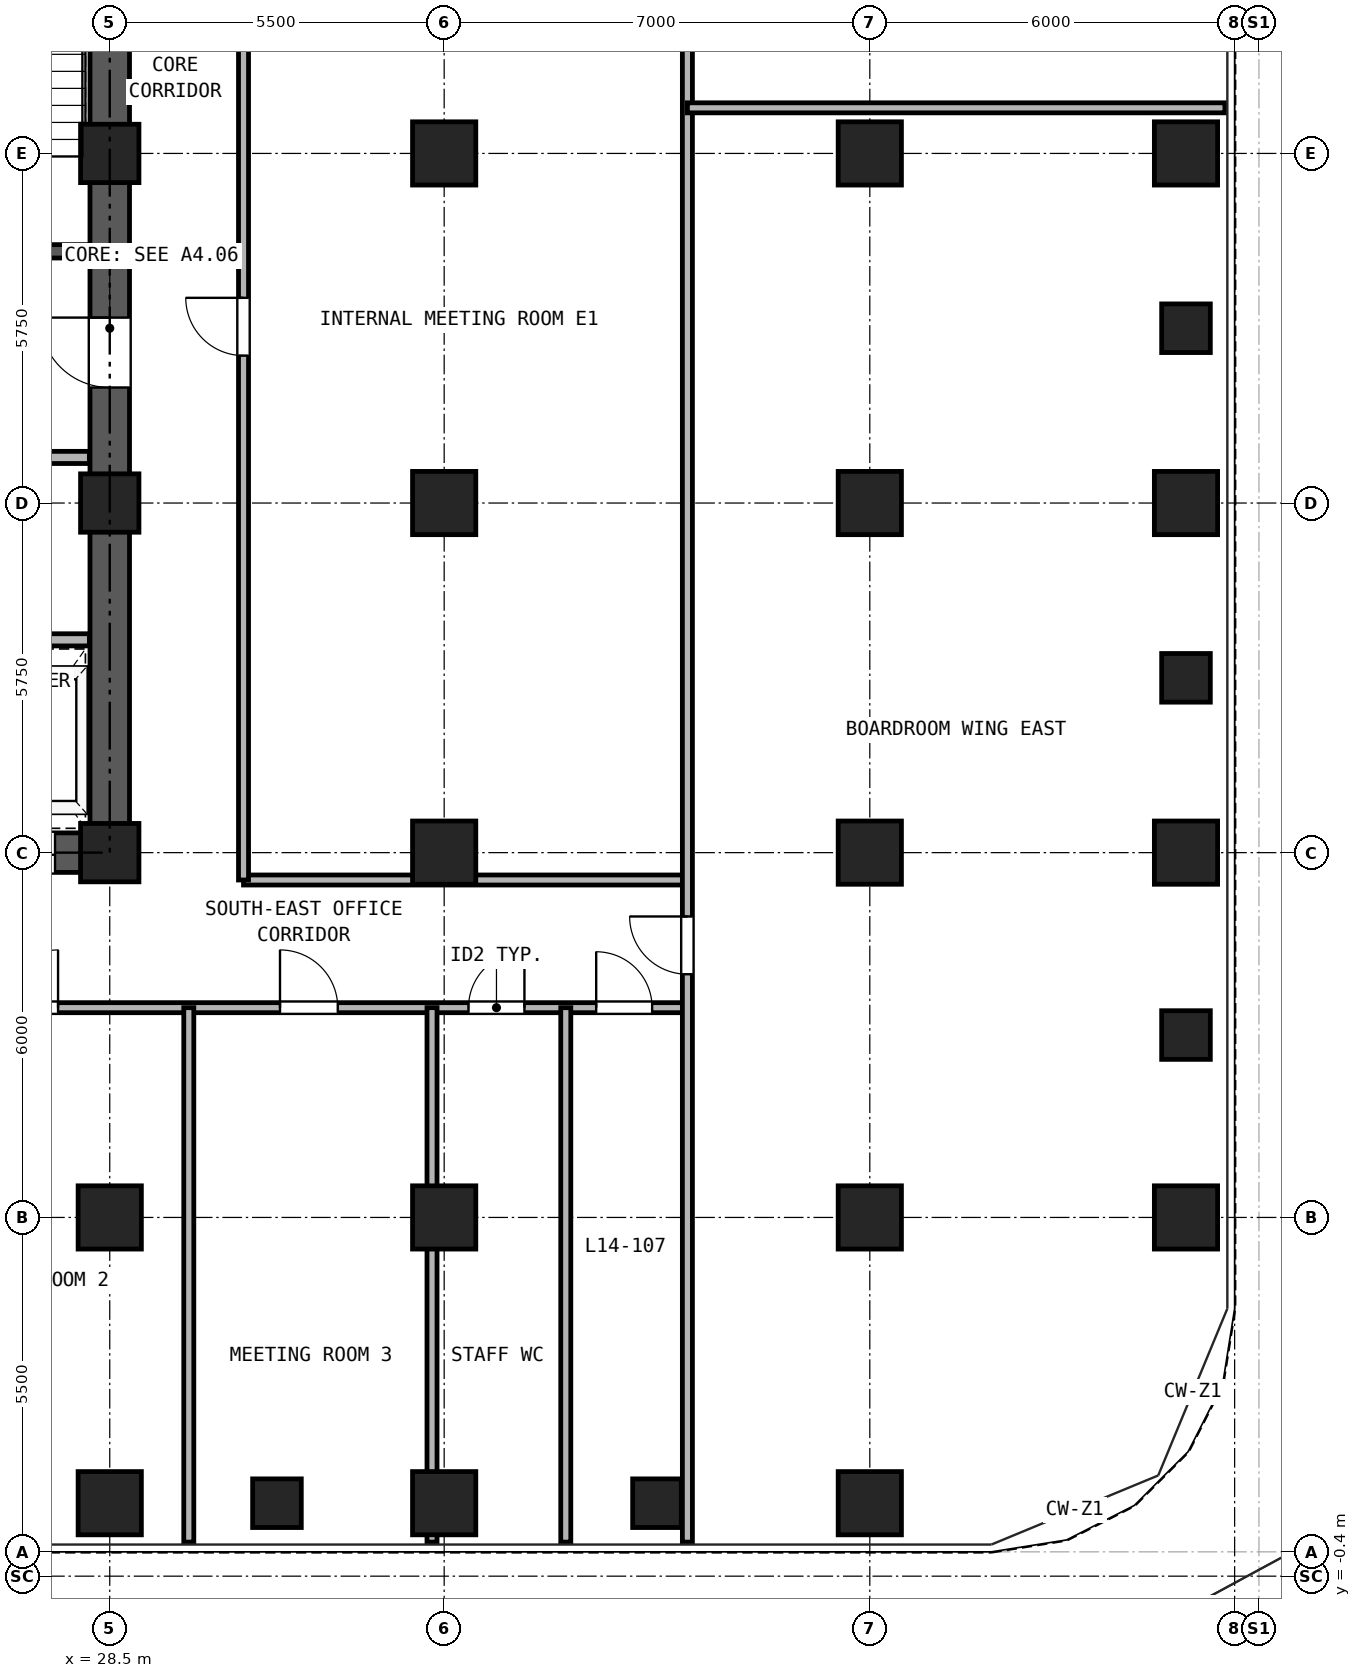
"""IFC4 building model, lengths in metres.
Left out: names, types, materials, properties, quantities, classifications, styles, units other than length and angle.
Written with IfcOpenShell. Run it as: python <this file> out.ifc"""

import sys

from ifc_helpers import new_model, si_unit, direction, frame, frame_2d, origin, origin_2d, place, context, subcontext, project, spatial, rectangle, hollow_rectangle, extrude, source, transform, mapped, element, fill, save


model = new_model("IFC4")
c1 = context("Model", 3, precision=1e-05, world=origin(), true_north=direction((0.0, 1.0)))
c2 = subcontext(c1, "Body", "Model", "MODEL_VIEW")
j1 = project(units=[si_unit("LENGTHUNIT", "METRE"), si_unit("PLANEANGLEUNIT", "RADIAN")], contexts=[c1])
p1 = place(None, origin())
s1 = spatial("IfcSite", under=j1, at=p1, CompositionType="ELEMENT")
p2 = place(p1, origin())
s2 = spatial("IfcBuilding", under=s1, at=p2, CompositionType="ELEMENT")
p3 = place(p2, frame((0.0, 0.0, 54.9)))
s3 = spatial("IfcBuildingStorey", under=s2, at=p3, CompositionType="ELEMENT", Elevation=54.9)
m1 = source(origin(), c2, "Body", "SweptSolid", [
    extrude(hollow_rectangle(XDim=1.04, YDim=1.04, WallThickness=0.065, at=origin_2d()), origin(), (0.0, 0.0, 1.0), 3.32),
])
for number, where, z_axis, x_axis in (
    (1, (28.5, 0.8, 0.0), (0.0, 0.0, 1.0), (1.0, 0.0, 0.0)),
    (2, (34.0, 0.8, 0.0), (0.0, 0.0, 1.0), (1.0, 0.0, 0.0)),
    (3, (41.0, 0.8, 0.0), (0.0, 0.0, 1.0), (1.0, 0.0, 0.0)),
    (4, (46.2, 5.5, 0.0), (0.0, 0.0, 1.0), (1.0, 0.0, 0.0)),
    (5, (46.2, 11.5, 0.0), (0.0, 0.0, 1.0), (1.0, 0.0, 0.0)),
    (6, (46.2, 17.25, 0.0), (0.0, 0.0, 1.0), (1.0, 0.0, 0.0)),
    (7, (46.2, 23.0, 0.0), (0.0, 0.0, 1.0), (1.0, 0.0, 0.0)),
    (8, (28.5, 5.5, 0.0), (0.0, 0.0, 1.0), (1.0, 0.0, 0.0)),
):
    element("IfcColumn", number, at=place(p3, frame(where, z_axis=z_axis, x_axis=x_axis)), inside=s3, PredefinedType="COLUMN", context=c2, shape_type="MappedRepresentation", body=[
        mapped(m1, transform((0.0, 0.0, 0.0), x_axis=(1.0, 0.0, 0.0), y_axis=(0.0, 1.0, 0.0), z_axis=(0.0, 0.0, 1.0), scale=1.0)),
    ])
m2 = source(origin(), c2, "Body", "SweptSolid", [
    extrude(hollow_rectangle(XDim=0.96, YDim=0.96, WallThickness=0.06, at=origin_2d()), origin(), (0.0, 0.0, 1.0), 3.32),
])
for number, where, z_axis, x_axis in (
    (9, (28.5, 11.5, 0.0), (0.0, 0.0, 1.0), (1.0, 0.0, 0.0)),
    (10, (28.5, 17.25, 0.0), (0.0, 0.0, 1.0), (1.0, 0.0, 0.0)),
    (11, (28.5, 23.0, 0.0), (0.0, 0.0, 1.0), (1.0, 0.0, 0.0)),
):
    element("IfcColumn", number, at=place(p3, frame(where, z_axis=z_axis, x_axis=x_axis)), inside=s3, PredefinedType="COLUMN", context=c2, shape_type="MappedRepresentation", body=[
        mapped(m2, transform((0.0, 0.0, 0.0), x_axis=(1.0, 0.0, 0.0), y_axis=(0.0, 1.0, 0.0), z_axis=(0.0, 0.0, 1.0), scale=1.0)),
    ])
for number, where, z_axis, x_axis in (
    (12, (34.0, 5.5, 0.0), (0.0, 0.0, 1.0), (1.0, 0.0, 0.0)),
    (13, (34.0, 11.5, 0.0), (0.0, 0.0, 1.0), (1.0, 0.0, 0.0)),
    (14, (34.0, 17.25, 0.0), (0.0, 0.0, 1.0), (1.0, 0.0, 0.0)),
    (15, (34.0, 23.0, 0.0), (0.0, 0.0, 1.0), (1.0, 0.0, 0.0)),
    (16, (41.0, 5.5, 0.0), (0.0, 0.0, 1.0), (1.0, 0.0, 0.0)),
    (17, (41.0, 11.5, 0.0), (0.0, 0.0, 1.0), (1.0, 0.0, 0.0)),
    (18, (41.0, 17.25, 0.0), (0.0, 0.0, 1.0), (1.0, 0.0, 0.0)),
    (19, (41.0, 23.0, 0.0), (0.0, 0.0, 1.0), (1.0, 0.0, 0.0)),
):
    element("IfcColumn", number, at=place(p3, frame(where, z_axis=z_axis, x_axis=x_axis)), inside=s3, PredefinedType="COLUMN", context=c2, shape_type="MappedRepresentation", body=[
        mapped(m1, transform((0.0, 0.0, 0.0), x_axis=(1.0, 0.0, 0.0), y_axis=(0.0, 1.0, 0.0), z_axis=(0.0, 0.0, 1.0), scale=1.0)),
    ])
m3 = source(origin(), c2, "Body", "SweptSolid", [
    extrude(hollow_rectangle(XDim=0.8, YDim=0.8, WallThickness=0.045, at=origin_2d()), origin(), (0.0, 0.0, 1.0), 3.32),
])
for number, where, z_axis, x_axis in (
    (20, (31.25, 0.8, 0.0), (0.0, 0.0, 1.0), (1.0, 0.0, 0.0)),
    (21, (37.5, 0.8, 0.0), (0.0, 0.0, 1.0), (1.0, 0.0, 0.0)),
    (22, (46.2, 8.5, 0.0), (0.0, 0.0, 1.0), (1.0, 0.0, 0.0)),
    (23, (46.2, 14.375, 0.0), (0.0, 0.0, 1.0), (1.0, 0.0, 0.0)),
    (24, (46.2, 20.125, 0.0), (0.0, 0.0, 1.0), (1.0, 0.0, 0.0)),
):
    element("IfcColumn", number, at=place(p3, frame(where, z_axis=z_axis, x_axis=x_axis)), inside=s3, PredefinedType="COLUMN", context=c2, shape_type="MappedRepresentation", body=[
        mapped(m3, transform((0.0, 0.0, 0.0), x_axis=(1.0, 0.0, 0.0), y_axis=(0.0, 1.0, 0.0), z_axis=(0.0, 0.0, 1.0), scale=1.0)),
    ])
p4 = place(p3, frame((18.175, 11.5, 0.0), z_axis=(0.0, 0.0, 1.0), x_axis=(1.0, 0.0, 0.0)))
e25 = element("IfcWall", 25, at=p4, inside=s3, PredefinedType="SHEAR", context=c2, shape_type="SweptSolid", body=[
    extrude(rectangle(XDim=10.65, YDim=0.65, at=frame_2d((5.325, 0.0))), origin(), (0.0, 0.0, 1.0), 3.32),
])
p5 = place(p4, frame((1.195, 0.0, 0.0)))
e26 = element("IfcOpeningElement", 26, at=p5, cuts=e25, PredefinedType="OPENING", context=c2, shape_type="SweptSolid", body=[
    extrude(rectangle(XDim=1.1, YDim=2.25, at=frame_2d((0.55, 1.125))), frame((0.0, 0.335, 0.0), z_axis=(0.0, -1.0, 0.0), x_axis=(1.0, 0.0, 0.0)), (0.0, 0.0, 1.0), 0.67),
])
p6 = place(p4, frame((3.495, 0.0, 0.0)))
e27 = element("IfcOpeningElement", 27, at=p6, cuts=e25, PredefinedType="OPENING", context=c2, shape_type="SweptSolid", body=[
    extrude(rectangle(XDim=1.1, YDim=2.25, at=frame_2d((0.55, 1.125))), frame((0.0, 0.335, 0.0), z_axis=(0.0, -1.0, 0.0), x_axis=(1.0, 0.0, 0.0)), (0.0, 0.0, 1.0), 0.67),
])
p7 = place(p4, frame((5.925, 0.0, 0.0)))
e28 = element("IfcOpeningElement", 28, at=p7, cuts=e25, PredefinedType="OPENING", context=c2, shape_type="SweptSolid", body=[
    extrude(rectangle(XDim=1.1, YDim=2.25, at=frame_2d((0.55, 1.125))), frame((0.0, 0.335, 0.0), z_axis=(0.0, -1.0, 0.0), x_axis=(1.0, 0.0, 0.0)), (0.0, 0.0, 1.0), 0.67),
])
p8 = place(p4, frame((8.325, 0.0, 0.0)))
e29 = element("IfcOpeningElement", 29, at=p8, cuts=e25, PredefinedType="OPENING", context=c2, shape_type="SweptSolid", body=[
    extrude(rectangle(XDim=1.1, YDim=2.25, at=frame_2d((0.55, 1.125))), frame((0.0, 0.335, 0.0), z_axis=(0.0, -1.0, 0.0), x_axis=(1.0, 0.0, 0.0)), (0.0, 0.0, 1.0), 0.67),
])
p9 = place(p3, frame((28.5, 11.825, 0.0), z_axis=(0.0, 0.0, 1.0), x_axis=(0.0, 1.0, 0.0)))
e30 = element("IfcWall", 30, at=p9, inside=s3, PredefinedType="SHEAR", context=c2, shape_type="SweptSolid", body=[
    extrude(rectangle(XDim=16.6, YDim=0.65, at=frame_2d((8.3, 0.0))), origin(), (0.0, 0.0, 1.0), 3.32),
])
p10 = place(p9, frame((7.325, 0.0, 0.0)))
e31 = element("IfcOpeningElement", 31, at=p10, cuts=e30, PredefinedType="OPENING", context=c2, shape_type="SweptSolid", body=[
    extrude(rectangle(XDim=1.15, YDim=2.2, at=frame_2d((0.575, 1.1))), frame((0.0, 0.335, 0.0), z_axis=(0.0, -1.0, 0.0), x_axis=(1.0, 0.0, 0.0)), (0.0, 0.0, 1.0), 0.67),
])
p11 = place(p3, frame((25.13, 21.39, 0.0), z_axis=(0.0, 0.0, 1.0), x_axis=(1.0, 0.0, 0.0)))
e32 = element("IfcWall", 32, at=p11, inside=s3, PredefinedType="SOLIDWALL", context=c2, shape_type="SweptSolid", body=[
    extrude(rectangle(XDim=3.035, YDim=0.22, at=frame_2d((1.518, 0.0))), origin(), (0.0, 0.0, 1.0), 3.32),
])
p12 = place(p11, frame((0.92, 0.0, 0.0)))
e33 = element("IfcOpeningElement", 33, at=p12, cuts=e32, PredefinedType="OPENING", context=c2, shape_type="SweptSolid", body=[
    extrude(rectangle(XDim=1.15, YDim=2.2, at=frame_2d((0.575, 1.1))), frame((0.0, 0.12, 0.0), z_axis=(0.0, -1.0, 0.0), x_axis=(1.0, 0.0, 0.0)), (0.0, 0.0, 1.0), 0.24),
])
p13 = place(p3, frame((18.835, 18.0, 0.0), z_axis=(0.0, 0.0, 1.0), x_axis=(1.0, 0.0, 0.0)))
e34 = element("IfcWall", 34, at=p13, inside=s3, PredefinedType="PARTITIONING", context=c2, shape_type="SweptSolid", body=[
    extrude(rectangle(XDim=9.33, YDim=0.2, at=frame_2d((4.665, 0.0))), origin(), (0.0, 0.0, 1.0), 3.32),
])
p14 = place(p13, frame((0.415, 0.0, 0.0)))
e35 = element("IfcOpeningElement", 35, at=p14, cuts=e34, PredefinedType="OPENING", context=c2, shape_type="SweptSolid", body=[
    extrude(rectangle(XDim=1.3, YDim=2.3, at=frame_2d((0.65, 1.15))), frame((0.0, 0.11, 0.0), z_axis=(0.0, -1.0, 0.0), x_axis=(1.0, 0.0, 0.0)), (0.0, 0.0, 1.0), 0.22),
])
p15 = place(p13, frame((2.515, 0.0, 0.0)))
e36 = element("IfcOpeningElement", 36, at=p15, cuts=e34, PredefinedType="OPENING", context=c2, shape_type="SweptSolid", body=[
    extrude(rectangle(XDim=1.3, YDim=2.3, at=frame_2d((0.65, 1.15))), frame((0.0, 0.11, 0.0), z_axis=(0.0, -1.0, 0.0), x_axis=(1.0, 0.0, 0.0)), (0.0, 0.0, 1.0), 0.22),
])
p16 = place(p13, frame((7.015, 0.0, 0.0)))
e37 = element("IfcOpeningElement", 37, at=p16, cuts=e34, PredefinedType="OPENING", context=c2, shape_type="SweptSolid", body=[
    extrude(rectangle(XDim=1.0, YDim=2.15, at=frame_2d((0.5, 1.075))), frame((0.0, 0.11, 0.0), z_axis=(0.0, -1.0, 0.0), x_axis=(1.0, 0.0, 0.0)), (0.0, 0.0, 1.0), 0.22),
])
p17 = place(p3, frame((18.835, 15.0, 0.0), z_axis=(0.0, 0.0, 1.0), x_axis=(1.0, 0.0, 0.0)))
e38 = element("IfcWall", 38, at=p17, inside=s3, PredefinedType="PARTITIONING", context=c2, shape_type="SweptSolid", body=[
    extrude(rectangle(XDim=9.33, YDim=0.2, at=frame_2d((4.665, 0.0))), origin(), (0.0, 0.0, 1.0), 3.32),
])
p18 = place(p3, frame((9.0, 8.95, 0.0), z_axis=(0.0, 0.0, 1.0), x_axis=(1.0, 0.0, 0.0)))
e39 = element("IfcWall", 39, at=p18, inside=s3, PredefinedType="PARTITIONING", context=c2, shape_type="SweptSolid", body=[
    extrude(rectangle(XDim=29.0, YDim=0.165, at=frame_2d((14.5, 0.0))), origin(), (0.0, 0.0, 1.0), 3.32),
])
p19 = place(p18, frame((2.1, 0.0, 0.0)))
e40 = element("IfcOpeningElement", 40, at=p19, cuts=e39, PredefinedType="OPENING", context=c2, shape_type="SweptSolid", body=[
    extrude(rectangle(XDim=0.95, YDim=2.15, at=frame_2d((0.475, 1.075))), frame((0.0, 0.093, 0.0), z_axis=(0.0, -1.0, 0.0), x_axis=(1.0, 0.0, 0.0)), (0.0, 0.0, 1.0), 0.185),
])
p20 = place(p18, frame((7.3, 0.0, 0.0)))
e41 = element("IfcOpeningElement", 41, at=p20, cuts=e39, PredefinedType="OPENING", context=c2, shape_type="SweptSolid", body=[
    extrude(rectangle(XDim=0.95, YDim=2.15, at=frame_2d((0.475, 1.075))), frame((0.0, 0.093, 0.0), z_axis=(0.0, -1.0, 0.0), x_axis=(1.0, 0.0, 0.0)), (0.0, 0.0, 1.0), 0.185),
])
p21 = place(p18, frame((12.5, 0.0, 0.0)))
e42 = element("IfcOpeningElement", 42, at=p21, cuts=e39, PredefinedType="OPENING", context=c2, shape_type="SweptSolid", body=[
    extrude(rectangle(XDim=0.95, YDim=2.15, at=frame_2d((0.475, 1.075))), frame((0.0, 0.093, 0.0), z_axis=(0.0, -1.0, 0.0), x_axis=(1.0, 0.0, 0.0)), (0.0, 0.0, 1.0), 0.185),
])
p22 = place(p18, frame((17.7, 0.0, 0.0)))
e43 = element("IfcOpeningElement", 43, at=p22, cuts=e39, PredefinedType="OPENING", context=c2, shape_type="SweptSolid", body=[
    extrude(rectangle(XDim=0.95, YDim=2.15, at=frame_2d((0.475, 1.075))), frame((0.0, 0.093, 0.0), z_axis=(0.0, -1.0, 0.0), x_axis=(1.0, 0.0, 0.0)), (0.0, 0.0, 1.0), 0.185),
])
p23 = place(p18, frame((22.3, 0.0, 0.0)))
e44 = element("IfcOpeningElement", 44, at=p23, cuts=e39, PredefinedType="OPENING", context=c2, shape_type="SweptSolid", body=[
    extrude(rectangle(XDim=0.95, YDim=2.15, at=frame_2d((0.475, 1.075))), frame((0.0, 0.093, 0.0), z_axis=(0.0, -1.0, 0.0), x_axis=(1.0, 0.0, 0.0)), (0.0, 0.0, 1.0), 0.185),
])
p24 = place(p18, frame((25.4, 0.0, 0.0)))
e45 = element("IfcOpeningElement", 45, at=p24, cuts=e39, PredefinedType="OPENING", context=c2, shape_type="SweptSolid", body=[
    extrude(rectangle(XDim=0.92, YDim=2.1, at=frame_2d((0.46, 1.05))), frame((0.0, 0.093, 0.0), z_axis=(0.0, -1.0, 0.0), x_axis=(1.0, 0.0, 0.0)), (0.0, 0.0, 1.0), 0.185),
])
p25 = place(p18, frame((27.5, 0.0, 0.0)))
e46 = element("IfcOpeningElement", 46, at=p25, cuts=e39, PredefinedType="OPENING", context=c2, shape_type="SweptSolid", body=[
    extrude(rectangle(XDim=0.92, YDim=2.1, at=frame_2d((0.46, 1.05))), frame((0.0, 0.093, 0.0), z_axis=(0.0, -1.0, 0.0), x_axis=(1.0, 0.0, 0.0)), (0.0, 0.0, 1.0), 0.185),
])
p26 = place(p3, frame((30.7, 11.05, 0.0), z_axis=(0.0, 0.0, 1.0), x_axis=(1.0, 0.0, 0.0)))
e47 = element("IfcWall", 47, at=p26, inside=s3, PredefinedType="PARTITIONING", context=c2, shape_type="SweptSolid", body=[
    extrude(rectangle(XDim=7.3, YDim=0.165, at=frame_2d((3.65, 0.0))), origin(), (0.0, 0.0, 1.0), 3.32),
])
p27 = place(p3, frame((30.7, 11.05, 0.0), z_axis=(0.0, 0.0, 1.0), x_axis=(0.0, 1.0, 0.0)))
e48 = element("IfcWall", 48, at=p27, inside=s3, PredefinedType="PARTITIONING", context=c2, shape_type="SweptSolid", body=[
    extrude(rectangle(XDim=18.25, YDim=0.165, at=frame_2d((9.125, 0.0))), origin(), (0.0, 0.0, 1.0), 3.32),
])
p28 = place(p27, frame((8.625, 0.0, 0.0)))
e49 = element("IfcOpeningElement", 49, at=p28, cuts=e48, PredefinedType="OPENING", context=c2, shape_type="SweptSolid", body=[
    extrude(rectangle(XDim=0.95, YDim=2.15, at=frame_2d((0.475, 1.075))), frame((0.0, 0.093, 0.0), z_axis=(0.0, -1.0, 0.0), x_axis=(1.0, 0.0, 0.0)), (0.0, 0.0, 1.0), 0.185),
])
p29 = place(p3, frame((38.0, 0.16, 0.0), z_axis=(0.0, 0.0, 1.0), x_axis=(0.0, 1.0, 0.0)))
e50 = element("IfcWall", 50, at=p29, inside=s3, PredefinedType="PARTITIONING", context=c2, shape_type="SweptSolid", body=[
    extrude(rectangle(XDim=40.18, YDim=0.165, at=frame_2d((20.09, 0.0))), origin(), (0.0, 0.0, 1.0), 3.32),
])
p30 = place(p29, frame((9.34, 0.0, 0.0)))
e51 = element("IfcOpeningElement", 51, at=p30, cuts=e50, PredefinedType="OPENING", context=c2, shape_type="SweptSolid", body=[
    extrude(rectangle(XDim=0.95, YDim=2.15, at=frame_2d((0.475, 1.075))), frame((0.0, 0.093, 0.0), z_axis=(0.0, -1.0, 0.0), x_axis=(1.0, 0.0, 0.0)), (0.0, 0.0, 1.0), 0.185),
])
p31 = place(p29, frame((29.69, 0.0, 0.0)))
e52 = element("IfcOpeningElement", 52, at=p31, cuts=e50, PredefinedType="OPENING", context=c2, shape_type="SweptSolid", body=[
    extrude(rectangle(XDim=0.95, YDim=2.15, at=frame_2d((0.475, 1.075))), frame((0.0, 0.093, 0.0), z_axis=(0.0, -1.0, 0.0), x_axis=(1.0, 0.0, 0.0)), (0.0, 0.0, 1.0), 0.185),
])
p32 = place(p3, frame((29.8, 0.16, 0.0), z_axis=(0.0, 0.0, 1.0), x_axis=(0.0, 1.0, 0.0)))
e53 = element("IfcWall", 53, at=p32, inside=s3, PredefinedType="PARTITIONING", context=c2, shape_type="SweptSolid", body=[
    extrude(rectangle(XDim=8.79, YDim=0.165, at=frame_2d((4.395, 0.0))), origin(), (0.0, 0.0, 1.0), 3.32),
])
p33 = place(p3, frame((33.8, 0.16, 0.0), z_axis=(0.0, 0.0, 1.0), x_axis=(0.0, 1.0, 0.0)))
e54 = element("IfcWall", 54, at=p33, inside=s3, PredefinedType="PARTITIONING", context=c2, shape_type="SweptSolid", body=[
    extrude(rectangle(XDim=8.79, YDim=0.165, at=frame_2d((4.395, 0.0))), origin(), (0.0, 0.0, 1.0), 2.539),
])
p34 = place(p3, frame((36.0, 0.16, 0.0), z_axis=(0.0, 0.0, 1.0), x_axis=(0.0, 1.0, 0.0)))
e55 = element("IfcWall", 55, at=p34, inside=s3, PredefinedType="PARTITIONING", context=c2, shape_type="SweptSolid", body=[
    extrude(rectangle(XDim=8.79, YDim=0.165, at=frame_2d((4.395, 0.0))), origin(), (0.0, 0.0, 1.0), 3.32),
])
p35 = place(p3, frame((38.0, 23.75, 0.0), z_axis=(0.0, 0.0, 1.0), x_axis=(1.0, 0.0, 0.0)))
e56 = element("IfcWall", 56, at=p35, inside=s3, PredefinedType="PARTITIONING", context=c2, shape_type="SweptSolid", body=[
    extrude(rectangle(XDim=8.84, YDim=0.165, at=frame_2d((4.42, 0.0))), origin(), (0.0, 0.0, 1.0), 3.32),
])
p36 = place(p10, origin())
e57 = element("IfcDoor", 57, at=p36, inside=s3, OperationType="SINGLE_SWING_RIGHT", PredefinedType="DOOR", context=c2, shape_type="SweptSolid", body=[
    extrude(rectangle(XDim=1.15, YDim=2.2, at=frame_2d((0.575, 1.1))), frame((0.0, 0.025, 0.0), z_axis=(0.0, -1.0, 0.0), x_axis=(1.0, 0.0, 0.0)), (0.0, 0.0, 1.0), 0.05),
])
fill(e31, e57)
p37 = place(p8, frame((1.1, 0.0, 0.0), z_axis=(0.0, 0.0, 1.0), x_axis=(-1.0, 0.0, 0.0)))
e58 = element("IfcDoor", 58, at=p37, inside=s3, OperationType="DOUBLE_DOOR_SLIDING", PredefinedType="DOOR", context=c2, shape_type="SweptSolid", body=[
    extrude(rectangle(XDim=1.1, YDim=2.25, at=frame_2d((0.55, 1.125))), frame((0.0, 0.025, 0.0), z_axis=(0.0, -1.0, 0.0), x_axis=(1.0, 0.0, 0.0)), (0.0, 0.0, 1.0), 0.05),
])
fill(e29, e58)
p38 = place(p22, frame((0.95, 0.0, 0.0), z_axis=(0.0, 0.0, 1.0), x_axis=(-1.0, 0.0, 0.0)))
e59 = element("IfcDoor", 59, at=p38, inside=s3, OperationType="SINGLE_SWING_RIGHT", PredefinedType="DOOR", context=c2, shape_type="SweptSolid", body=[
    extrude(rectangle(XDim=0.95, YDim=2.15, at=frame_2d((0.475, 1.075))), frame((0.0, 0.025, 0.0), z_axis=(0.0, -1.0, 0.0), x_axis=(1.0, 0.0, 0.0)), (0.0, 0.0, 1.0), 0.05),
])
fill(e43, e59)
p39 = place(p23, frame((0.95, 0.0, 0.0), z_axis=(0.0, 0.0, 1.0), x_axis=(-1.0, 0.0, 0.0)))
e60 = element("IfcDoor", 60, at=p39, inside=s3, OperationType="SINGLE_SWING_LEFT", PredefinedType="DOOR", context=c2, shape_type="SweptSolid", body=[
    extrude(rectangle(XDim=0.95, YDim=2.15, at=frame_2d((0.475, 1.075))), frame((0.0, 0.025, 0.0), z_axis=(0.0, -1.0, 0.0), x_axis=(1.0, 0.0, 0.0)), (0.0, 0.0, 1.0), 0.05),
])
fill(e44, e60)
p40 = place(p24, frame((0.92, 0.0, 0.0), z_axis=(0.0, 0.0, 1.0), x_axis=(-1.0, 0.0, 0.0)))
e61 = element("IfcDoor", 61, at=p40, inside=s3, OperationType="SINGLE_SWING_RIGHT", PredefinedType="DOOR", context=c2, shape_type="SweptSolid", body=[
    extrude(rectangle(XDim=0.92, YDim=2.1, at=frame_2d((0.46, 1.05))), frame((0.0, 0.025, 0.0), z_axis=(0.0, -1.0, 0.0), x_axis=(1.0, 0.0, 0.0)), (0.0, 0.0, 1.0), 0.05),
])
fill(e45, e61)
p41 = place(p25, frame((0.92, 0.0, 0.0), z_axis=(0.0, 0.0, 1.0), x_axis=(-1.0, 0.0, 0.0)))
e62 = element("IfcDoor", 62, at=p41, inside=s3, OperationType="SINGLE_SWING_LEFT", PredefinedType="DOOR", context=c2, shape_type="SweptSolid", body=[
    extrude(rectangle(XDim=0.92, YDim=2.1, at=frame_2d((0.46, 1.05))), frame((0.0, 0.025, 0.0), z_axis=(0.0, -1.0, 0.0), x_axis=(1.0, 0.0, 0.0)), (0.0, 0.0, 1.0), 0.05),
])
fill(e46, e62)
p42 = place(p30, origin())
e63 = element("IfcDoor", 63, at=p42, inside=s3, OperationType="SINGLE_SWING_RIGHT", PredefinedType="DOOR", context=c2, shape_type="SweptSolid", body=[
    extrude(rectangle(XDim=0.95, YDim=2.15, at=frame_2d((0.475, 1.075))), frame((0.0, 0.025, 0.0), z_axis=(0.0, -1.0, 0.0), x_axis=(1.0, 0.0, 0.0)), (0.0, 0.0, 1.0), 0.05),
])
fill(e51, e63)
p43 = place(p28, origin())
e64 = element("IfcDoor", 64, at=p43, inside=s3, OperationType="SINGLE_SWING_RIGHT", PredefinedType="DOOR", context=c2, shape_type="SweptSolid", body=[
    extrude(rectangle(XDim=0.95, YDim=2.15, at=frame_2d((0.475, 1.075))), frame((0.0, 0.025, 0.0), z_axis=(0.0, -1.0, 0.0), x_axis=(1.0, 0.0, 0.0)), (0.0, 0.0, 1.0), 0.05),
])
fill(e49, e64)
save(model, sys.argv[1])
